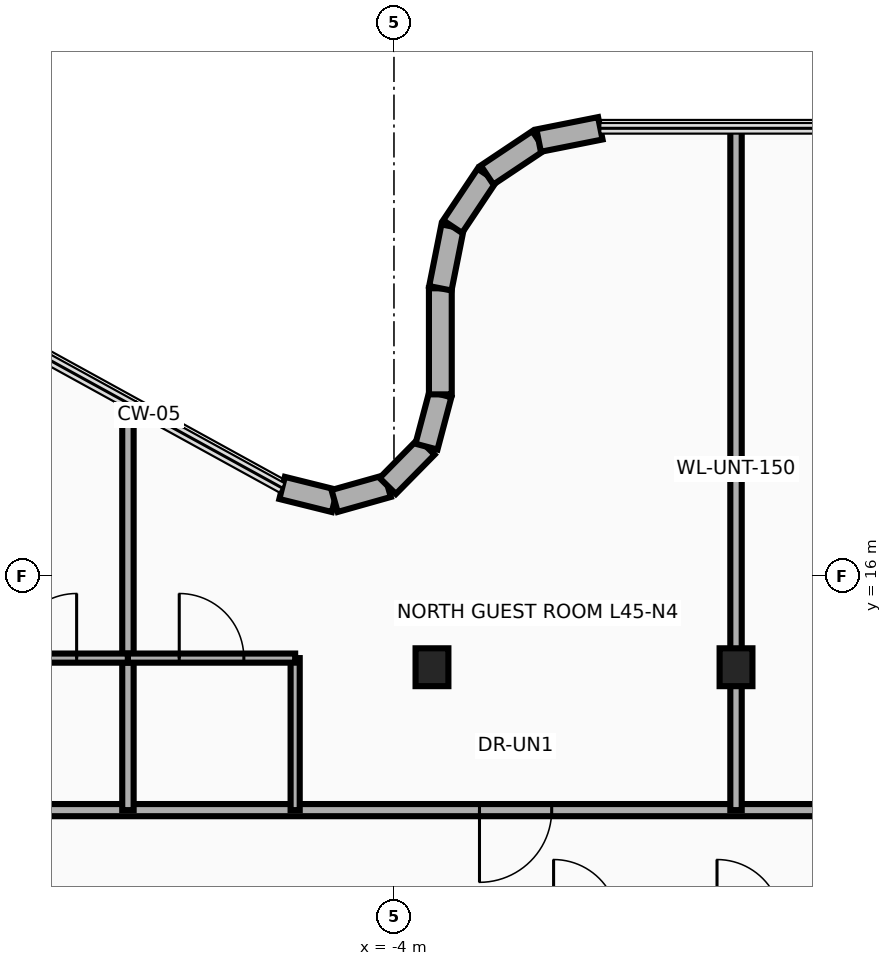
"""IFC4 building model, lengths in metres.
Left out: names, types, materials, properties, quantities, classifications, styles, units other than length and angle.
Written with IfcOpenShell. Run it as: python <this file> out.ifc"""

import sys

from ifc_helpers import new_model, si_unit, direction, frame, frame_2d, origin, origin_2d, place, context, subcontext, project, spatial, rectangle, i_section, extrude, source, transform, mapped, element, fill, save


model = new_model("IFC4")
c1 = context("Model", 3, precision=1e-05, world=origin(), true_north=direction((0.0, 1.0)))
c2 = subcontext(c1, "Body", "Model", "MODEL_VIEW")
j1 = project(units=[si_unit("LENGTHUNIT", "METRE"), si_unit("PLANEANGLEUNIT", "RADIAN")], contexts=[c1])
p1 = place(None, origin())
s1 = spatial("IfcSite", under=j1, at=p1, CompositionType="ELEMENT")
p2 = place(p1, origin())
s2 = spatial("IfcBuilding", under=s1, at=p2, CompositionType="ELEMENT")
p3 = place(p2, frame((0.0, 0.0, 176.55)))
s3 = spatial("IfcBuildingStorey", under=s2, at=p3, CompositionType="ELEMENT", Elevation=176.55)
m1 = source(origin(), c2, "Body", "SweptSolid", [
    extrude(i_section(OverallWidth=0.432, OverallDepth=0.498, WebThickness=0.056, FlangeThickness=0.089, at=origin_2d()), origin(), (0.0, 0.0, 1.0), 3.95),
])
for number, where, z_axis, x_axis in (
    (1, (-3.5, 14.8, 0.0), (0.0, 0.0, 1.0), (1.0, 0.0, 0.0)),
    (2, (0.5, 14.8, 0.0), (0.0, 0.0, 1.0), (1.0, 0.0, 0.0)),
):
    element("IfcColumn", number, at=place(p3, frame(where, z_axis=z_axis, x_axis=x_axis)), inside=s3, PredefinedType="COLUMN", context=c2, shape_type="MappedRepresentation", body=[
        mapped(m1, transform((0.0, 0.0, 0.0), x_axis=(1.0, 0.0, 0.0), y_axis=(0.0, 1.0, 0.0), z_axis=(0.0, 0.0, 1.0), scale=1.0)),
    ])
p4 = place(p3, frame((-5.472, 17.159, 0.0), z_axis=(0.0, 0.0, 1.0), x_axis=(0.970564820059, -0.240840050789, 0.0)))
e3 = element("IfcWall", 3, at=p4, inside=s3, PredefinedType="SOLIDWALL", context=c2, shape_type="SweptSolid", body=[
    extrude(rectangle(XDim=0.712, YDim=0.3, at=frame_2d((0.356, 0.0))), origin(), (0.0, 0.0, 1.0), 3.63),
])
p5 = place(p3, frame((-4.781, 16.987, 0.0), z_axis=(0.0, 0.0, 1.0), x_axis=(0.962494705656, 0.271300463662, 0.0)))
e4 = element("IfcWall", 4, at=p5, inside=s3, PredefinedType="SOLIDWALL", context=c2, shape_type="SweptSolid", body=[
    extrude(rectangle(XDim=0.726, YDim=0.3, at=frame_2d((0.363, 0.0))), origin(), (0.0, 0.0, 1.0), 3.63),
])
p6 = place(p3, frame((-4.082, 17.184, 0.0), z_axis=(0.0, 0.0, 1.0), x_axis=(0.701538604215, 0.712631452293, 0.0)))
e5 = element("IfcWall", 5, at=p6, inside=s3, PredefinedType="SOLIDWALL", context=c2, shape_type="SweptSolid", body=[
    extrude(rectangle(XDim=0.726, YDim=0.3, at=frame_2d((0.363, 0.0))), origin(), (0.0, 0.0, 1.0), 2.615),
])
p7 = place(p3, frame((-3.573, 17.702, 0.0), z_axis=(0.0, 0.0, 1.0), x_axis=(0.256637481794, 0.966507735581, 0.0)))
e6 = element("IfcWall", 6, at=p7, inside=s3, PredefinedType="SOLIDWALL", context=c2, shape_type="SweptSolid", body=[
    extrude(rectangle(XDim=0.712, YDim=0.3, at=frame_2d((0.356, 0.0))), origin(), (0.0, 0.0, 1.0), 2.615),
])
p8 = place(p3, frame((-3.39, 18.39, 0.0), z_axis=(0.0, 0.0, 1.0), x_axis=(0.0, 1.0, 0.0)))
e7 = element("IfcWall", 7, at=p8, inside=s3, PredefinedType="SOLIDWALL", context=c2, shape_type="SweptSolid", body=[
    extrude(rectangle(XDim=1.396, YDim=0.3, at=frame_2d((0.698, 0.0))), origin(), (0.0, 0.0, 1.0), 2.615),
])
p9 = place(p3, frame((-3.39, 19.785, 0.0), z_axis=(0.0, 0.0, 1.0), x_axis=(0.195094354541, 0.980784478276, 0.0)))
e8 = element("IfcWall", 8, at=p9, inside=s3, PredefinedType="SOLIDWALL", context=c2, shape_type="SweptSolid", body=[
    extrude(rectangle(XDim=0.827, YDim=0.3, at=frame_2d((0.414, 0.0))), origin(), (0.0, 0.0, 1.0), 2.615),
])
p10 = place(p3, frame((-3.229, 20.596, 0.0), z_axis=(0.0, 0.0, 1.0), x_axis=(0.55545926088, 0.831543750805, 0.0)))
e9 = element("IfcWall", 9, at=p10, inside=s3, PredefinedType="SOLIDWALL", context=c2, shape_type="SweptSolid", body=[
    extrude(rectangle(XDim=0.816, YDim=0.3, at=frame_2d((0.408, 0.0))), origin(), (0.0, 0.0, 1.0), 2.615),
])
p11 = place(p3, frame((-2.775, 21.275, 0.0), z_axis=(0.0, 0.0, 1.0), x_axis=(0.831543750805, 0.55545926088, 0.0)))
e10 = element("IfcWall", 10, at=p11, inside=s3, PredefinedType="SOLIDWALL", context=c2, shape_type="SweptSolid", body=[
    extrude(rectangle(XDim=0.816, YDim=0.3, at=frame_2d((0.408, 0.0))), origin(), (0.0, 0.0, 1.0), 3.63),
])
p12 = place(p3, frame((-2.096, 21.729, 0.0), z_axis=(0.0, 0.0, 1.0), x_axis=(0.980784478276, 0.195094354541, 0.0)))
e11 = element("IfcWall", 11, at=p12, inside=s3, PredefinedType="SOLIDWALL", context=c2, shape_type="SweptSolid", body=[
    extrude(rectangle(XDim=0.827, YDim=0.3, at=frame_2d((0.414, 0.0))), origin(), (0.0, 0.0, 1.0), 3.076),
])
p13 = place(p3, frame((-28.25, 12.92, 0.0), z_axis=(0.0, 0.0, 1.0), x_axis=(1.0, 0.0, 0.0)))
e12 = element("IfcWall", 12, at=p13, inside=s3, PredefinedType="PARTITIONING", context=c2, shape_type="SweptSolid", body=[
    extrude(rectangle(XDim=36.75, YDim=0.16, at=frame_2d((18.375, 0.0))), origin(), (0.0, 0.0, 1.0), 2.615),
])
p14 = place(p13, frame((2.75, 0.0, 0.0)))
e13 = element("IfcOpeningElement", 13, at=p14, cuts=e12, PredefinedType="OPENING", context=c2, shape_type="SweptSolid", body=[
    extrude(rectangle(XDim=0.95, YDim=2.15, at=frame_2d((0.475, 1.075))), frame((0.0, 0.095, 0.0), z_axis=(0.0, -1.0, 0.0), x_axis=(1.0, 0.0, 0.0)), (0.0, 0.0, 1.0), 0.19),
])
p15 = place(p13, frame((8.025, 0.0, 0.0)))
e14 = element("IfcOpeningElement", 14, at=p15, cuts=e12, PredefinedType="OPENING", context=c2, shape_type="SweptSolid", body=[
    extrude(rectangle(XDim=0.95, YDim=2.15, at=frame_2d((0.475, 1.075))), frame((0.0, 0.095, 0.0), z_axis=(0.0, -1.0, 0.0), x_axis=(1.0, 0.0, 0.0)), (0.0, 0.0, 1.0), 0.19),
])
p16 = place(p13, frame((15.175, 0.0, 0.0)))
e15 = element("IfcOpeningElement", 15, at=p16, cuts=e12, PredefinedType="OPENING", context=c2, shape_type="SweptSolid", body=[
    extrude(rectangle(XDim=0.95, YDim=2.15, at=frame_2d((0.475, 1.075))), frame((0.0, 0.095, 0.0), z_axis=(0.0, -1.0, 0.0), x_axis=(1.0, 0.0, 0.0)), (0.0, 0.0, 1.0), 0.19),
])
p17 = place(p13, frame((25.375, 0.0, 0.0)))
e16 = element("IfcOpeningElement", 16, at=p17, cuts=e12, PredefinedType="OPENING", context=c2, shape_type="SweptSolid", body=[
    extrude(rectangle(XDim=0.95, YDim=2.15, at=frame_2d((0.475, 1.075))), frame((0.0, 0.095, 0.0), z_axis=(0.0, -1.0, 0.0), x_axis=(1.0, 0.0, 0.0)), (0.0, 0.0, 1.0), 0.19),
])
p18 = place(p13, frame((32.275, 0.0, 0.0)))
e17 = element("IfcOpeningElement", 17, at=p18, cuts=e12, PredefinedType="OPENING", context=c2, shape_type="SweptSolid", body=[
    extrude(rectangle(XDim=0.95, YDim=2.15, at=frame_2d((0.475, 1.075))), frame((0.0, 0.095, 0.0), z_axis=(0.0, -1.0, 0.0), x_axis=(1.0, 0.0, 0.0)), (0.0, 0.0, 1.0), 0.19),
])
p19 = place(p3, frame((-7.5, 12.92, 0.0), z_axis=(0.0, 0.0, 1.0), x_axis=(0.0, 1.0, 0.0)))
e18 = element("IfcWall", 18, at=p19, inside=s3, PredefinedType="PARTITIONING", context=c2, shape_type="SweptSolid", body=[
    extrude(rectangle(XDim=5.354, YDim=0.15, at=frame_2d((2.677, 0.0))), origin(), (0.0, 0.0, 1.0), 2.415),
])
p20 = place(p3, frame((0.5, 12.92, 0.0), z_axis=(0.0, 0.0, 1.0), x_axis=(0.0, 1.0, 0.0)))
e19 = element("IfcWall", 19, at=p20, inside=s3, PredefinedType="PARTITIONING", context=c2, shape_type="SweptSolid", body=[
    extrude(rectangle(XDim=8.97, YDim=0.15, at=frame_2d((4.485, 0.0))), origin(), (0.0, 0.0, 1.0), 2.665),
])
p21 = place(p3, frame((-9.7, 14.92, 0.0), z_axis=(0.0, 0.0, 1.0), x_axis=(1.0, 0.0, 0.0)))
e20 = element("IfcWall", 20, at=p21, inside=s3, PredefinedType="PARTITIONING", context=c2, shape_type="SweptSolid", body=[
    extrude(rectangle(XDim=2.2, YDim=0.12, at=frame_2d((1.1, 0.0))), origin(), (0.0, 0.0, 1.0), 2.415),
])
p22 = place(p21, frame((0.675, 0.0, 0.0)))
e21 = element("IfcOpeningElement", 21, at=p22, cuts=e20, PredefinedType="OPENING", context=c2, shape_type="SweptSolid", body=[
    extrude(rectangle(XDim=0.85, YDim=2.1, at=frame_2d((0.425, 1.05))), frame((0.0, 0.075, 0.0), z_axis=(0.0, -1.0, 0.0), x_axis=(1.0, 0.0, 0.0)), (0.0, 0.0, 1.0), 0.15),
])
p23 = place(p3, frame((-5.3, 12.92, 0.0), z_axis=(0.0, 0.0, 1.0), x_axis=(0.0, 1.0, 0.0)))
e22 = element("IfcWall", 22, at=p23, inside=s3, PredefinedType="PARTITIONING", context=c2, shape_type="SweptSolid", body=[
    extrude(rectangle(XDim=2.0, YDim=0.12, at=frame_2d((1.0, 0.0))), origin(), (0.0, 0.0, 1.0), 2.415),
])
p24 = place(p3, frame((-7.5, 14.92, 0.0), z_axis=(0.0, 0.0, 1.0), x_axis=(1.0, 0.0, 0.0)))
e23 = element("IfcWall", 23, at=p24, inside=s3, PredefinedType="PARTITIONING", context=c2, shape_type="SweptSolid", body=[
    extrude(rectangle(XDim=2.2, YDim=0.12, at=frame_2d((1.1, 0.0))), origin(), (0.0, 0.0, 1.0), 2.415),
])
p25 = place(p24, frame((0.675, 0.0, 0.0)))
e24 = element("IfcOpeningElement", 24, at=p25, cuts=e23, PredefinedType="OPENING", context=c2, shape_type="SweptSolid", body=[
    extrude(rectangle(XDim=0.85, YDim=2.1, at=frame_2d((0.425, 1.05))), frame((0.0, 0.075, 0.0), z_axis=(0.0, -1.0, 0.0), x_axis=(1.0, 0.0, 0.0)), (0.0, 0.0, 1.0), 0.15),
])
p26 = place(p22, origin())
e25 = element("IfcDoor", 25, at=p26, inside=s3, OperationType="SINGLE_SWING_RIGHT", PredefinedType="DOOR", context=c2, shape_type="SweptSolid", body=[
    extrude(rectangle(XDim=0.85, YDim=2.1, at=frame_2d((0.425, 1.05))), frame((0.0, 0.025, 0.0), z_axis=(0.0, -1.0, 0.0), x_axis=(1.0, 0.0, 0.0)), (0.0, 0.0, 1.0), 0.05),
])
fill(e21, e25)
p27 = place(p17, frame((0.95, 0.0, 0.0), z_axis=(0.0, 0.0, 1.0), x_axis=(-1.0, 0.0, 0.0)))
e26 = element("IfcDoor", 26, at=p27, inside=s3, OperationType="SINGLE_SWING_LEFT", PredefinedType="DOOR", context=c2, shape_type="SweptSolid", body=[
    extrude(rectangle(XDim=0.95, YDim=2.15, at=frame_2d((0.475, 1.075))), frame((0.0, 0.025, 0.0), z_axis=(0.0, -1.0, 0.0), x_axis=(1.0, 0.0, 0.0)), (0.0, 0.0, 1.0), 0.05),
])
fill(e16, e26)
p28 = place(p25, origin())
e27 = element("IfcDoor", 27, at=p28, inside=s3, OperationType="SINGLE_SWING_RIGHT", PredefinedType="DOOR", context=c2, shape_type="SweptSolid", body=[
    extrude(rectangle(XDim=0.85, YDim=2.1, at=frame_2d((0.425, 1.05))), frame((0.0, 0.025, 0.0), z_axis=(0.0, -1.0, 0.0), x_axis=(1.0, 0.0, 0.0)), (0.0, 0.0, 1.0), 0.05),
])
fill(e24, e27)
save(model, sys.argv[1])
